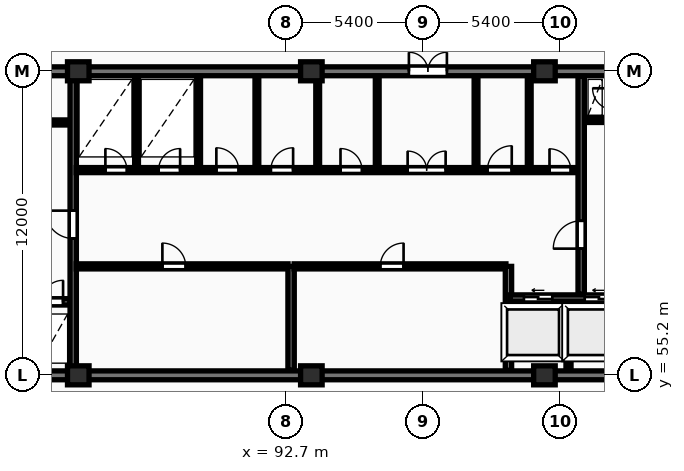
"""IFC4 building model, lengths in metres.
Left out: names, types, materials, properties, quantities, classifications, styles, units other than length and angle.
Written with IfcOpenShell. Run it as: python <this file> out.ifc"""

import sys

from ifc_helpers import new_model, si_unit, direction, frame, frame_2d, origin, origin_2d, place, context, subcontext, project, spatial, rectangle, extrude, element, fill, save


model = new_model("IFC4")
c1 = context("Model", 3, precision=1e-05, world=origin(), true_north=direction((0.0, 1.0)))
c2 = subcontext(c1, "Body", "Model", "MODEL_VIEW")
j1 = project(units=[si_unit("LENGTHUNIT", "METRE"), si_unit("PLANEANGLEUNIT", "RADIAN")], contexts=[c1])
p1 = place(None, origin())
s1 = spatial("IfcSite", under=j1, at=p1, CompositionType="ELEMENT")
p2 = place(p1, origin())
s2 = spatial("IfcBuilding", under=s1, at=p2, CompositionType="ELEMENT")
p3 = place(p2, frame((0.0, 0.0, 210.85)))
s3 = spatial("IfcBuildingStorey", under=s2, at=p3, CompositionType="ELEMENT", Elevation=210.85)
for number, where, z_axis, x_axis in (
    (1, (84.5, 55.2, 0.0), (0.0, 0.0, 1.0), (1.0, 0.0, 0.0)),
    (2, (84.5, 67.2, 0.0), (0.0, 0.0, 1.0), (1.0, 0.0, 0.0)),
    (3, (93.7, 55.2, 0.0), (0.0, 0.0, 1.0), (1.0, 0.0, 0.0)),
    (4, (93.7, 67.2, 0.0), (0.0, 0.0, 1.0), (1.0, 0.0, 0.0)),
    (5, (102.9, 55.2, 0.0), (0.0, 0.0, 1.0), (1.0, 0.0, 0.0)),
    (6, (102.9, 67.2, 0.0), (0.0, 0.0, 1.0), (1.0, 0.0, 0.0)),
):
    element("IfcColumn", number, at=place(p3, frame(where, z_axis=z_axis, x_axis=x_axis)), inside=s3, PredefinedType="COLUMN", context=c2, shape_type="SweptSolid", body=[
        extrude(rectangle(XDim=0.85, YDim=0.75, at=origin_2d()), origin(), (0.0, 0.0, 1.0), 3.25),
    ])
p4 = place(p3, frame((75.95, 55.2, 0.0), z_axis=(0.0, 0.0, 1.0), x_axis=(1.0, 0.0, 0.0)))
e7 = element("IfcWall", 7, at=p4, inside=s3, PredefinedType="SHEAR", context=c2, shape_type="SweptSolid", body=[
    extrude(rectangle(XDim=36.3, YDim=0.35, at=frame_2d((18.15, 0.0))), origin(), (0.0, 0.0, 1.0), 3.25),
])
p5 = place(p3, frame((75.95, 67.2, 0.0), z_axis=(0.0, 0.0, 1.0), x_axis=(1.0, 0.0, 0.0)))
e8 = element("IfcWall", 8, at=p5, inside=s3, PredefinedType="SHEAR", context=c2, shape_type="SweptSolid", body=[
    extrude(rectangle(XDim=36.3, YDim=0.35, at=frame_2d((18.15, 0.0))), origin(), (0.0, 0.0, 1.0), 3.25),
])
p6 = place(p5, frame((5.25, 0.0, 0.0)))
e9 = element("IfcOpeningElement", 9, at=p6, cuts=e8, PredefinedType="OPENING", context=c2, shape_type="SweptSolid", body=[
    extrude(rectangle(XDim=1.0, YDim=2.15, at=frame_2d((0.5, 1.075))), frame((0.0, 0.185, 0.0), z_axis=(0.0, -1.0, 0.0), x_axis=(1.0, 0.0, 0.0)), (0.0, 0.0, 1.0), 0.37),
])
p7 = place(p5, frame((21.6, 0.0, 0.0)))
e10 = element("IfcOpeningElement", 10, at=p7, cuts=e8, PredefinedType="OPENING", context=c2, shape_type="SweptSolid", body=[
    extrude(rectangle(XDim=1.5, YDim=2.2, at=frame_2d((0.75, 1.1))), frame((0.0, 0.185, 0.0), z_axis=(0.0, -1.0, 0.0), x_axis=(1.0, 0.0, 0.0)), (0.0, 0.0, 1.0), 0.37),
])
p8 = place(p5, frame((30.45, 0.0, 0.0)))
e11 = element("IfcOpeningElement", 11, at=p8, cuts=e8, PredefinedType="OPENING", context=c2, shape_type="SweptSolid", body=[
    extrude(rectangle(XDim=1.0, YDim=2.15, at=frame_2d((0.5, 1.075))), frame((0.0, 0.185, 0.0), z_axis=(0.0, -1.0, 0.0), x_axis=(1.0, 0.0, 0.0)), (0.0, 0.0, 1.0), 0.37),
])
p9 = place(p3, frame((79.79, 58.1, 0.0), z_axis=(0.0, 0.0, 1.0), x_axis=(1.0, 0.0, 0.0)))
e12 = element("IfcWall", 12, at=p9, inside=s3, PredefinedType="SHEAR", context=c2, shape_type="SweptSolid", body=[
    extrude(rectangle(XDim=4.39, YDim=0.25, at=frame_2d((2.195, 0.0))), origin(), (0.0, 0.0, 1.0), 3.25),
])
p10 = place(p9, frame((1.05, 0.0, 0.0)))
e13 = element("IfcOpeningElement", 13, at=p10, cuts=e12, PredefinedType="OPENING", context=c2, shape_type="SweptSolid", body=[
    extrude(rectangle(XDim=1.12, YDim=2.12, at=frame_2d((0.56, 1.06))), frame((0.0, 0.135, 0.0), z_axis=(0.0, -1.0, 0.0), x_axis=(1.0, 0.0, 0.0)), (0.0, 0.0, 1.0), 0.27),
])
p11 = place(p9, frame((3.26, 0.0, 0.0)))
e14 = element("IfcOpeningElement", 14, at=p11, cuts=e12, PredefinedType="OPENING", context=c2, shape_type="SweptSolid", body=[
    extrude(rectangle(XDim=0.85, YDim=2.05, at=frame_2d((0.425, 1.025))), frame((0.0, 0.135, 0.0), z_axis=(0.0, -1.0, 0.0), x_axis=(1.0, 0.0, 0.0)), (0.0, 0.0, 1.0), 0.27),
])
p12 = place(p3, frame((79.79, 65.18, 0.0), z_axis=(0.0, 0.0, 1.0), x_axis=(1.0, 0.0, 0.0)))
e15 = element("IfcWall", 15, at=p12, inside=s3, PredefinedType="PARTITIONING", context=c2, shape_type="SweptSolid", body=[
    extrude(rectangle(XDim=4.39, YDim=0.2, at=frame_2d((2.195, 0.0))), origin(), (0.0, 0.0, 1.0), 2.97),
])
p13 = place(p12, frame((1.5, 0.0, 0.0)))
e16 = element("IfcOpeningElement", 16, at=p13, cuts=e15, PredefinedType="OPENING", context=c2, shape_type="SweptSolid", body=[
    extrude(rectangle(XDim=1.1, YDim=2.1, at=frame_2d((0.55, 1.05))), frame((0.0, 0.11, 0.0), z_axis=(0.0, -1.0, 0.0), x_axis=(1.0, 0.0, 0.0)), (0.0, 0.0, 1.0), 0.22),
])
p14 = place(p3, frame((84.3, 55.4, 0.0), z_axis=(0.0, 0.0, 1.0), x_axis=(0.0, 1.0, 0.0)))
e17 = element("IfcWall", 17, at=p14, inside=s3, PredefinedType="SHEAR", context=c2, shape_type="SweptSolid", body=[
    extrude(rectangle(XDim=11.6, YDim=0.25, at=frame_2d((5.8, 0.0))), origin(), (0.0, 0.0, 1.0), 3.25),
])
p15 = place(p14, frame((5.2, 0.0, 0.0)))
e18 = element("IfcOpeningElement", 18, at=p15, cuts=e17, PredefinedType="OPENING", context=c2, shape_type="SweptSolid", body=[
    extrude(rectangle(XDim=1.1, YDim=2.1, at=frame_2d((0.55, 1.05))), frame((0.0, 0.135, 0.0), z_axis=(0.0, -1.0, 0.0), x_axis=(1.0, 0.0, 0.0)), (0.0, 0.0, 1.0), 0.27),
])
p16 = place(p3, frame((84.42, 59.5, 0.0), z_axis=(0.0, 0.0, 1.0), x_axis=(1.0, 0.0, 0.0)))
e19 = element("IfcWall", 19, at=p16, inside=s3, PredefinedType="PARTITIONING", context=c2, shape_type="SweptSolid", body=[
    extrude(rectangle(XDim=8.36, YDim=0.2, at=frame_2d((4.18, 0.0))), origin(), (0.0, 0.0, 1.0), 2.97),
])
p17 = place(p16, frame((3.4, 0.0, 0.0)))
e20 = element("IfcOpeningElement", 20, at=p17, cuts=e19, PredefinedType="OPENING", context=c2, shape_type="SweptSolid", body=[
    extrude(rectangle(XDim=0.92, YDim=2.08, at=frame_2d((0.46, 1.04))), frame((0.0, 0.11, 0.0), z_axis=(0.0, -1.0, 0.0), x_axis=(1.0, 0.0, 0.0)), (0.0, 0.0, 1.0), 0.22),
])
p18 = place(p3, frame((92.9, 55.4, 0.0), z_axis=(0.0, 0.0, 1.0), x_axis=(0.0, 1.0, 0.0)))
e21 = element("IfcWall", 21, at=p18, inside=s3, PredefinedType="SHEAR", context=c2, shape_type="SweptSolid", body=[
    extrude(rectangle(XDim=4.1, YDim=0.25, at=frame_2d((2.05, 0.0))), origin(), (0.0, 0.0, 1.0), 3.25),
])
p19 = place(p3, frame((93.02, 59.5, 0.0), z_axis=(0.0, 0.0, 1.0), x_axis=(1.0, 0.0, 0.0)))
e22 = element("IfcWall", 22, at=p19, inside=s3, PredefinedType="PARTITIONING", context=c2, shape_type="SweptSolid", body=[
    extrude(rectangle(XDim=8.36, YDim=0.2, at=frame_2d((4.18, 0.0))), origin(), (0.0, 0.0, 1.0), 2.97),
])
p20 = place(p19, frame((3.4, 0.0, 0.0)))
e23 = element("IfcOpeningElement", 23, at=p20, cuts=e22, PredefinedType="OPENING", context=c2, shape_type="SweptSolid", body=[
    extrude(rectangle(XDim=0.92, YDim=2.08, at=frame_2d((0.46, 1.04))), frame((0.0, 0.11, 0.0), z_axis=(0.0, -1.0, 0.0), x_axis=(1.0, 0.0, 0.0)), (0.0, 0.0, 1.0), 0.22),
])
p21 = place(p3, frame((101.48, 55.4, 0.0), z_axis=(0.0, 0.0, 1.0), x_axis=(0.0, 1.0, 0.0)))
e24 = element("IfcWall", 24, at=p21, inside=s3, PredefinedType="SHEAR", context=c2, shape_type="SweptSolid", body=[
    extrude(rectangle(XDim=4.1, YDim=0.25, at=frame_2d((2.05, 0.0))), origin(), (0.0, 0.0, 1.0), 3.25),
])
p22 = place(p3, frame((103.85, 55.4, 0.0), z_axis=(0.0, 0.0, 1.0), x_axis=(0.0, 1.0, 0.0)))
e25 = element("IfcWall", 25, at=p22, inside=s3, PredefinedType="PARTITIONING", context=c2, shape_type="SweptSolid", body=[
    extrude(rectangle(XDim=2.72, YDim=0.2, at=frame_2d((1.36, 0.0))), origin(), (0.0, 0.0, 1.0), 2.97),
])
p23 = place(p3, frame((101.55, 58.25, 0.0), z_axis=(0.0, 0.0, 1.0), x_axis=(1.0, 0.0, 0.0)))
e26 = element("IfcWall", 26, at=p23, inside=s3, PredefinedType="SHEAR", context=c2, shape_type="SweptSolid", body=[
    extrude(rectangle(XDim=4.6, YDim=0.25, at=frame_2d((2.3, 0.0))), origin(), (0.0, 0.0, 1.0), 3.25),
])
p24 = place(p23, frame((0.54, 0.0, 0.0)))
e27 = element("IfcOpeningElement", 27, at=p24, cuts=e26, PredefinedType="OPENING", context=c2, shape_type="SweptSolid", body=[
    extrude(rectangle(XDim=1.12, YDim=2.12, at=frame_2d((0.56, 1.06))), frame((0.0, 0.135, 0.0), z_axis=(0.0, -1.0, 0.0), x_axis=(1.0, 0.0, 0.0)), (0.0, 0.0, 1.0), 0.27),
])
p25 = place(p23, frame((2.94, 0.0, 0.0)))
e28 = element("IfcOpeningElement", 28, at=p25, cuts=e26, PredefinedType="OPENING", context=c2, shape_type="SweptSolid", body=[
    extrude(rectangle(XDim=1.12, YDim=2.12, at=frame_2d((0.56, 1.06))), frame((0.0, 0.135, 0.0), z_axis=(0.0, -1.0, 0.0), x_axis=(1.0, 0.0, 0.0)), (0.0, 0.0, 1.0), 0.27),
])
for number, where, z_axis, x_axis in (
    (29, (86.8, 63.4, 0.0), (0.0, 0.0, 1.0), (0.0, 1.0, 0.0)),
    (30, (89.25, 63.4, 0.0), (0.0, 0.0, 1.0), (0.0, 1.0, 0.0)),
    (31, (91.55, 63.4, 0.0), (0.0, 0.0, 1.0), (0.0, 1.0, 0.0)),
):
    element("IfcWall", number, at=place(p3, frame(where, z_axis=z_axis, x_axis=x_axis)), inside=s3, PredefinedType="PARTITIONING", context=c2, shape_type="SweptSolid", body=[
        extrude(rectangle(XDim=3.6, YDim=0.15, at=frame_2d((1.8, 0.0))), origin(), (0.0, 0.0, 1.0), 2.97),
    ])
p26 = place(p3, frame((93.95, 63.4, 0.0), z_axis=(0.0, 0.0, 1.0), x_axis=(0.0, 1.0, 0.0)))
e32 = element("IfcWall", 32, at=p26, inside=s3, PredefinedType="PARTITIONING", context=c2, shape_type="SweptSolid", body=[
    extrude(rectangle(XDim=3.6, YDim=0.15, at=frame_2d((1.8, 0.0))), origin(), (0.0, 0.0, 1.0), 2.277),
])
for number, where, z_axis, x_axis in (
    (33, (102.3, 63.4, 0.0), (0.0, 0.0, 1.0), (0.0, 1.0, 0.0)),
    (34, (96.3, 63.4, 0.0), (0.0, 0.0, 1.0), (0.0, 1.0, 0.0)),
    (35, (100.2, 63.4, 0.0), (0.0, 0.0, 1.0), (0.0, 1.0, 0.0)),
):
    element("IfcWall", number, at=place(p3, frame(where, z_axis=z_axis, x_axis=x_axis)), inside=s3, PredefinedType="PARTITIONING", context=c2, shape_type="SweptSolid", body=[
        extrude(rectangle(XDim=3.6, YDim=0.15, at=frame_2d((1.8, 0.0))), origin(), (0.0, 0.0, 1.0), 2.97),
    ])
p27 = place(p3, frame((84.42, 63.3, 0.0), z_axis=(0.0, 0.0, 1.0), x_axis=(1.0, 0.0, 0.0)))
e36 = element("IfcWall", 36, at=p27, inside=s3, PredefinedType="PARTITIONING", context=c2, shape_type="SweptSolid", body=[
    extrude(rectangle(XDim=19.83, YDim=0.2, at=frame_2d((9.915, 0.0))), origin(), (0.0, 0.0, 1.0), 2.97),
])
p28 = place(p27, frame((1.15, 0.0, 0.0)))
e37 = element("IfcOpeningElement", 37, at=p28, cuts=e36, PredefinedType="OPENING", context=c2, shape_type="SweptSolid", body=[
    extrude(rectangle(XDim=0.85, YDim=2.05, at=frame_2d((0.425, 1.025))), frame((0.0, 0.11, 0.0), z_axis=(0.0, -1.0, 0.0), x_axis=(1.0, 0.0, 0.0)), (0.0, 0.0, 1.0), 0.22),
])
p29 = place(p27, frame((3.25, 0.0, 0.0)))
e38 = element("IfcOpeningElement", 38, at=p29, cuts=e36, PredefinedType="OPENING", context=c2, shape_type="SweptSolid", body=[
    extrude(rectangle(XDim=0.85, YDim=2.05, at=frame_2d((0.425, 1.025))), frame((0.0, 0.11, 0.0), z_axis=(0.0, -1.0, 0.0), x_axis=(1.0, 0.0, 0.0)), (0.0, 0.0, 1.0), 0.22),
])
p30 = place(p27, frame((13.08, 0.0, 0.0)))
e39 = element("IfcOpeningElement", 39, at=p30, cuts=e36, PredefinedType="OPENING", context=c2, shape_type="SweptSolid", body=[
    extrude(rectangle(XDim=1.5, YDim=2.2, at=frame_2d((0.75, 1.1))), frame((0.0, 0.11, 0.0), z_axis=(0.0, -1.0, 0.0), x_axis=(1.0, 0.0, 0.0)), (0.0, 0.0, 1.0), 0.22),
])
p31 = place(p27, frame((5.53, 0.0, 0.0)))
e40 = element("IfcOpeningElement", 40, at=p31, cuts=e36, PredefinedType="OPENING", context=c2, shape_type="SweptSolid", body=[
    extrude(rectangle(XDim=0.88, YDim=2.06, at=frame_2d((0.44, 1.03))), frame((0.0, 0.11, 0.0), z_axis=(0.0, -1.0, 0.0), x_axis=(1.0, 0.0, 0.0)), (0.0, 0.0, 1.0), 0.22),
])
p32 = place(p27, frame((7.68, 0.0, 0.0)))
e41 = element("IfcOpeningElement", 41, at=p32, cuts=e36, PredefinedType="OPENING", context=c2, shape_type="SweptSolid", body=[
    extrude(rectangle(XDim=0.88, YDim=2.06, at=frame_2d((0.44, 1.03))), frame((0.0, 0.11, 0.0), z_axis=(0.0, -1.0, 0.0), x_axis=(1.0, 0.0, 0.0)), (0.0, 0.0, 1.0), 0.22),
])
p33 = place(p27, frame((10.43, 0.0, 0.0)))
e42 = element("IfcOpeningElement", 42, at=p33, cuts=e36, PredefinedType="OPENING", context=c2, shape_type="SweptSolid", body=[
    extrude(rectangle(XDim=0.85, YDim=2.05, at=frame_2d((0.425, 1.025))), frame((0.0, 0.11, 0.0), z_axis=(0.0, -1.0, 0.0), x_axis=(1.0, 0.0, 0.0)), (0.0, 0.0, 1.0), 0.22),
])
p34 = place(p27, frame((16.23, 0.0, 0.0)))
e43 = element("IfcOpeningElement", 43, at=p34, cuts=e36, PredefinedType="OPENING", context=c2, shape_type="SweptSolid", body=[
    extrude(rectangle(XDim=0.96, YDim=2.1, at=frame_2d((0.48, 1.05))), frame((0.0, 0.11, 0.0), z_axis=(0.0, -1.0, 0.0), x_axis=(1.0, 0.0, 0.0)), (0.0, 0.0, 1.0), 0.22),
])
p35 = place(p27, frame((18.68, 0.0, 0.0)))
e44 = element("IfcOpeningElement", 44, at=p35, cuts=e36, PredefinedType="OPENING", context=c2, shape_type="SweptSolid", body=[
    extrude(rectangle(XDim=0.84, YDim=2.04, at=frame_2d((0.42, 1.02))), frame((0.0, 0.11, 0.0), z_axis=(0.0, -1.0, 0.0), x_axis=(1.0, 0.0, 0.0)), (0.0, 0.0, 1.0), 0.22),
])
p36 = place(p3, frame((104.45, 65.28, 0.0), z_axis=(0.0, 0.0, 1.0), x_axis=(1.0, 0.0, 0.0)))
e45 = element("IfcWall", 45, at=p36, inside=s3, PredefinedType="PARTITIONING", context=c2, shape_type="SweptSolid", body=[
    extrude(rectangle(XDim=1.2, YDim=0.2, at=frame_2d((0.6, 0.0))), origin(), (0.0, 0.0, 1.0), 2.97),
])
p37 = place(p3, frame((104.35, 58.4, 0.0), z_axis=(0.0, 0.0, 1.0), x_axis=(0.0, 1.0, 0.0)))
e46 = element("IfcWall", 46, at=p37, inside=s3, PredefinedType="SHEAR", context=c2, shape_type="SweptSolid", body=[
    extrude(rectangle(XDim=8.6, YDim=0.25, at=frame_2d((4.3, 0.0))), origin(), (0.0, 0.0, 1.0), 3.25),
])
p38 = place(p37, frame((1.8, 0.0, 0.0)))
e47 = element("IfcOpeningElement", 47, at=p38, cuts=e46, PredefinedType="OPENING", context=c2, shape_type="SweptSolid", body=[
    extrude(rectangle(XDim=1.1, YDim=2.1, at=frame_2d((0.55, 1.05))), frame((0.0, 0.135, 0.0), z_axis=(0.0, -1.0, 0.0), x_axis=(1.0, 0.0, 0.0)), (0.0, 0.0, 1.0), 0.27),
])
p39 = place(p7, origin())
e48 = element("IfcDoor", 48, at=p39, inside=s3, OperationType="DOUBLE_DOOR_SINGLE_SWING", PredefinedType="DOOR", context=c2, shape_type="SweptSolid", body=[
    extrude(rectangle(XDim=1.5, YDim=2.2, at=frame_2d((0.75, 1.1))), frame((0.0, 0.025, 0.0), z_axis=(0.0, -1.0, 0.0), x_axis=(1.0, 0.0, 0.0)), (0.0, 0.0, 1.0), 0.05),
])
fill(e10, e48)
p40 = place(p11, origin())
e49 = element("IfcDoor", 49, at=p40, inside=s3, OperationType="SINGLE_SWING_RIGHT", PredefinedType="DOOR", context=c2, shape_type="SweptSolid", body=[
    extrude(rectangle(XDim=0.85, YDim=2.05, at=frame_2d((0.425, 1.025))), frame((0.0, 0.025, 0.0), z_axis=(0.0, -1.0, 0.0), x_axis=(1.0, 0.0, 0.0)), (0.0, 0.0, 1.0), 0.05),
])
fill(e14, e49)
p41 = place(p15, origin())
e50 = element("IfcDoor", 50, at=p41, inside=s3, OperationType="SINGLE_SWING_RIGHT", PredefinedType="DOOR", context=c2, shape_type="SweptSolid", body=[
    extrude(rectangle(XDim=1.1, YDim=2.1, at=frame_2d((0.55, 1.05))), frame((0.0, 0.025, 0.0), z_axis=(0.0, -1.0, 0.0), x_axis=(1.0, 0.0, 0.0)), (0.0, 0.0, 1.0), 0.05),
])
fill(e18, e50)
p42 = place(p17, origin())
e51 = element("IfcDoor", 51, at=p42, inside=s3, OperationType="SINGLE_SWING_LEFT", PredefinedType="DOOR", context=c2, shape_type="SweptSolid", body=[
    extrude(rectangle(XDim=0.92, YDim=2.08, at=frame_2d((0.46, 1.04))), frame((0.0, 0.025, 0.0), z_axis=(0.0, -1.0, 0.0), x_axis=(1.0, 0.0, 0.0)), (0.0, 0.0, 1.0), 0.05),
])
fill(e20, e51)
p43 = place(p20, origin())
e52 = element("IfcDoor", 52, at=p43, inside=s3, OperationType="SINGLE_SWING_RIGHT", PredefinedType="DOOR", context=c2, shape_type="SweptSolid", body=[
    extrude(rectangle(XDim=0.92, YDim=2.08, at=frame_2d((0.46, 1.04))), frame((0.0, 0.025, 0.0), z_axis=(0.0, -1.0, 0.0), x_axis=(1.0, 0.0, 0.0)), (0.0, 0.0, 1.0), 0.05),
])
fill(e23, e52)
p44 = place(p24, origin())
e53 = element("IfcDoor", 53, at=p44, inside=s3, OperationType="SLIDING_TO_LEFT", PredefinedType="DOOR", context=c2, shape_type="SweptSolid", body=[
    extrude(rectangle(XDim=1.12, YDim=2.12, at=frame_2d((0.56, 1.06))), frame((0.0, 0.025, 0.0), z_axis=(0.0, -1.0, 0.0), x_axis=(1.0, 0.0, 0.0)), (0.0, 0.0, 1.0), 0.05),
])
fill(e27, e53)
p45 = place(p25, origin())
e54 = element("IfcDoor", 54, at=p45, inside=s3, OperationType="SLIDING_TO_LEFT", PredefinedType="DOOR", context=c2, shape_type="SweptSolid", body=[
    extrude(rectangle(XDim=1.12, YDim=2.12, at=frame_2d((0.56, 1.06))), frame((0.0, 0.025, 0.0), z_axis=(0.0, -1.0, 0.0), x_axis=(1.0, 0.0, 0.0)), (0.0, 0.0, 1.0), 0.05),
])
fill(e28, e54)
p46 = place(p28, origin())
e55 = element("IfcDoor", 55, at=p46, inside=s3, OperationType="SINGLE_SWING_LEFT", PredefinedType="DOOR", context=c2, shape_type="SweptSolid", body=[
    extrude(rectangle(XDim=0.85, YDim=2.05, at=frame_2d((0.425, 1.025))), frame((0.0, 0.025, 0.0), z_axis=(0.0, -1.0, 0.0), x_axis=(1.0, 0.0, 0.0)), (0.0, 0.0, 1.0), 0.05),
])
fill(e37, e55)
p47 = place(p29, origin())
e56 = element("IfcDoor", 56, at=p47, inside=s3, OperationType="SINGLE_SWING_RIGHT", PredefinedType="DOOR", context=c2, shape_type="SweptSolid", body=[
    extrude(rectangle(XDim=0.85, YDim=2.05, at=frame_2d((0.425, 1.025))), frame((0.0, 0.025, 0.0), z_axis=(0.0, -1.0, 0.0), x_axis=(1.0, 0.0, 0.0)), (0.0, 0.0, 1.0), 0.05),
])
fill(e38, e56)
p48 = place(p30, origin())
e57 = element("IfcDoor", 57, at=p48, inside=s3, OperationType="DOUBLE_DOOR_SINGLE_SWING", PredefinedType="DOOR", context=c2, shape_type="SweptSolid", body=[
    extrude(rectangle(XDim=1.5, YDim=2.2, at=frame_2d((0.75, 1.1))), frame((0.0, 0.025, 0.0), z_axis=(0.0, -1.0, 0.0), x_axis=(1.0, 0.0, 0.0)), (0.0, 0.0, 1.0), 0.05),
])
fill(e39, e57)
p49 = place(p31, origin())
e58 = element("IfcDoor", 58, at=p49, inside=s3, OperationType="SINGLE_SWING_LEFT", PredefinedType="DOOR", context=c2, shape_type="SweptSolid", body=[
    extrude(rectangle(XDim=0.88, YDim=2.06, at=frame_2d((0.44, 1.03))), frame((0.0, 0.025, 0.0), z_axis=(0.0, -1.0, 0.0), x_axis=(1.0, 0.0, 0.0)), (0.0, 0.0, 1.0), 0.05),
])
fill(e40, e58)
p50 = place(p32, origin())
e59 = element("IfcDoor", 59, at=p50, inside=s3, OperationType="SINGLE_SWING_RIGHT", PredefinedType="DOOR", context=c2, shape_type="SweptSolid", body=[
    extrude(rectangle(XDim=0.88, YDim=2.06, at=frame_2d((0.44, 1.03))), frame((0.0, 0.025, 0.0), z_axis=(0.0, -1.0, 0.0), x_axis=(1.0, 0.0, 0.0)), (0.0, 0.0, 1.0), 0.05),
])
fill(e41, e59)
p51 = place(p33, origin())
e60 = element("IfcDoor", 60, at=p51, inside=s3, OperationType="SINGLE_SWING_LEFT", PredefinedType="DOOR", context=c2, shape_type="SweptSolid", body=[
    extrude(rectangle(XDim=0.85, YDim=2.05, at=frame_2d((0.425, 1.025))), frame((0.0, 0.025, 0.0), z_axis=(0.0, -1.0, 0.0), x_axis=(1.0, 0.0, 0.0)), (0.0, 0.0, 1.0), 0.05),
])
fill(e42, e60)
p52 = place(p34, origin())
e61 = element("IfcDoor", 61, at=p52, inside=s3, OperationType="SINGLE_SWING_RIGHT", PredefinedType="DOOR", context=c2, shape_type="SweptSolid", body=[
    extrude(rectangle(XDim=0.96, YDim=2.1, at=frame_2d((0.48, 1.05))), frame((0.0, 0.025, 0.0), z_axis=(0.0, -1.0, 0.0), x_axis=(1.0, 0.0, 0.0)), (0.0, 0.0, 1.0), 0.05),
])
fill(e43, e61)
p53 = place(p35, origin())
e62 = element("IfcDoor", 62, at=p53, inside=s3, OperationType="SINGLE_SWING_LEFT", PredefinedType="DOOR", context=c2, shape_type="SweptSolid", body=[
    extrude(rectangle(XDim=0.84, YDim=2.04, at=frame_2d((0.42, 1.02))), frame((0.0, 0.025, 0.0), z_axis=(0.0, -1.0, 0.0), x_axis=(1.0, 0.0, 0.0)), (0.0, 0.0, 1.0), 0.05),
])
fill(e44, e62)
p54 = place(p38, origin())
e63 = element("IfcDoor", 63, at=p54, inside=s3, OperationType="SINGLE_SWING_LEFT", PredefinedType="DOOR", context=c2, shape_type="SweptSolid", body=[
    extrude(rectangle(XDim=1.1, YDim=2.1, at=frame_2d((0.55, 1.05))), frame((0.0, 0.025, 0.0), z_axis=(0.0, -1.0, 0.0), x_axis=(1.0, 0.0, 0.0)), (0.0, 0.0, 1.0), 0.05),
])
fill(e47, e63)
save(model, sys.argv[1])
